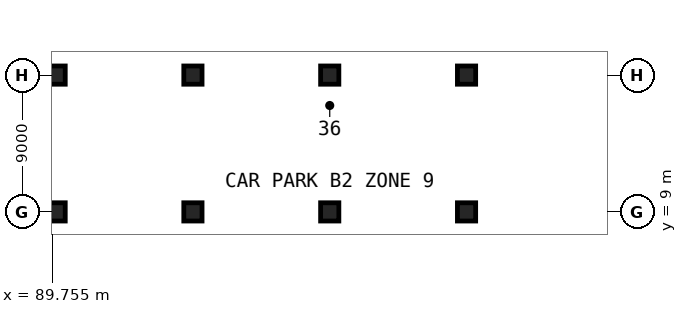
"""IFC4 building model, lengths in metres.
Left out: names, types, materials, properties, quantities, classifications, styles, units other than length and angle.
Written with IfcOpenShell. Run it as: python <this file> out.ifc"""

import sys

from ifc_helpers import new_model, si_unit, direction, frame, origin, origin_2d, place, context, subcontext, project, spatial, rectangle, extrude, element, save


model = new_model("IFC4")
c1 = context("Model", 3, precision=1e-05, world=origin(), true_north=direction((0.0, 1.0)))
c2 = subcontext(c1, "Body", "Model", "MODEL_VIEW")
j1 = project(units=[si_unit("LENGTHUNIT", "METRE"), si_unit("PLANEANGLEUNIT", "RADIAN")], contexts=[c1])
p1 = place(None, origin())
s1 = spatial("IfcSite", under=j1, at=p1, CompositionType="ELEMENT")
p2 = place(p1, origin())
s2 = spatial("IfcBuilding", under=s1, at=p2, CompositionType="ELEMENT")
p3 = place(p2, frame((0.0, 0.0, -9.0)))
s3 = spatial("IfcBuildingStorey", under=s2, at=p3, CompositionType="ELEMENT", Elevation=-9.0)
for number, where, z_axis, x_axis in (
    (1, (90.0, 9.0, 0.0), (0.0, 0.0, 1.0), (1.0, 0.0, 0.0)),
    (2, (90.0, 18.0, 0.0), (0.0, 0.0, 1.0), (1.0, 0.0, 0.0)),
    (3, (99.0, 9.0, 0.0), (0.0, 0.0, 1.0), (1.0, 0.0, 0.0)),
    (4, (99.0, 18.0, 0.0), (0.0, 0.0, 1.0), (1.0, 0.0, 0.0)),
    (5, (108.0, 9.0, 0.0), (0.0, 0.0, 1.0), (1.0, 0.0, 0.0)),
    (6, (108.0, 18.0, 0.0), (0.0, 0.0, 1.0), (1.0, 0.0, 0.0)),
    (7, (117.0, 9.0, 0.0), (0.0, 0.0, 1.0), (1.0, 0.0, 0.0)),
    (8, (117.0, 18.0, 0.0), (0.0, 0.0, 1.0), (1.0, 0.0, 0.0)),
):
    element("IfcColumn", number, at=place(p3, frame(where, z_axis=z_axis, x_axis=x_axis)), inside=s3, PredefinedType="COLUMN", context=c2, shape_type="SweptSolid", body=[
        extrude(rectangle(XDim=1.2, YDim=1.2, at=origin_2d()), origin(), (0.0, 0.0, 1.0), 4.5),
    ])
save(model, sys.argv[1])
